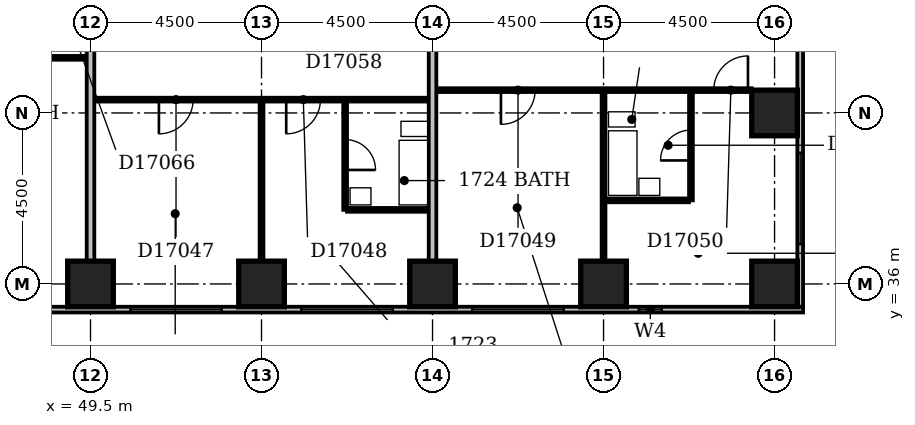
"""IFC4 building model, lengths in metres.
Left out: names, types, materials, properties, quantities, classifications, styles, units other than length and angle.
Written with IfcOpenShell. Run it as: python <this file> out.ifc"""

import sys

from ifc_helpers import new_model, si_unit, direction, frame, frame_2d, origin, origin_2d, place, context, subcontext, project, spatial, rectangle, extrude, element, fill, save


model = new_model("IFC4")
c1 = context("Model", 3, precision=1e-05, world=origin(), true_north=direction((0.0, 1.0)))
c2 = subcontext(c1, "Body", "Model", "MODEL_VIEW")
j1 = project(units=[si_unit("LENGTHUNIT", "METRE"), si_unit("PLANEANGLEUNIT", "RADIAN")], contexts=[c1])
p1 = place(None, origin())
s1 = spatial("IfcSite", under=j1, at=p1, CompositionType="ELEMENT")
p2 = place(p1, origin())
s2 = spatial("IfcBuilding", under=s1, at=p2, CompositionType="ELEMENT")
p3 = place(p2, frame((0.0, 0.0, 72.2)))
s3 = spatial("IfcBuildingStorey", under=s2, at=p3, CompositionType="ELEMENT", Elevation=72.2)
for number, where, z_axis, x_axis in (
    (1, (49.5, 36.0, -0.3), (0.0, 0.0, 1.0), (1.0, 0.0, 0.0)),
    (2, (54.0, 36.0, -0.3), (0.0, 0.0, 1.0), (1.0, 0.0, 0.0)),
    (3, (58.5, 36.0, -0.3), (0.0, 0.0, 1.0), (1.0, 0.0, 0.0)),
    (4, (63.0, 36.0, -0.3), (0.0, 0.0, 1.0), (1.0, 0.0, 0.0)),
    (5, (67.5, 36.0, -0.3), (0.0, 0.0, 1.0), (1.0, 0.0, 0.0)),
    (6, (67.5, 40.5, -0.3), (0.0, 0.0, 1.0), (1.0, 0.0, 0.0)),
):
    element("IfcColumn", number, at=place(p3, frame(where, z_axis=z_axis, x_axis=x_axis)), inside=s3, PredefinedType="COLUMN", context=c2, shape_type="SweptSolid", body=[
        extrude(rectangle(XDim=1.2, YDim=1.2, at=origin_2d()), origin(), (0.0, 0.0, 1.0), 3.6),
    ])
p4 = place(p3, frame((23.1, 35.325, 0.0), z_axis=(0.0, 0.0, 1.0), x_axis=(1.0, 0.0, 0.0)))
e7 = element("IfcWall", 7, at=p4, inside=s3, PredefinedType="STANDARD", context=c2, shape_type="SweptSolid", body=[
    extrude(rectangle(XDim=45.15, YDim=0.15, at=frame_2d((22.575, 0.0))), origin(), (0.0, 0.0, 1.0), 2.7),
])
p5 = place(p4, frame((0.45, 0.0, 0.6)))
e8 = element("IfcOpeningElement", 8, at=p5, cuts=e7, PredefinedType="OPENING", context=c2, shape_type="SweptSolid", body=[
    extrude(rectangle(XDim=2.4, YDim=1.8, at=frame_2d((1.2, 0.9))), frame((0.0, 0.087, 0.0), z_axis=(0.0, -1.0, 0.0), x_axis=(1.0, 0.0, 0.0)), (0.0, 0.0, 1.0), 0.174),
])
p6 = place(p4, frame((4.95, 0.0, 0.6)))
e9 = element("IfcOpeningElement", 9, at=p6, cuts=e7, PredefinedType="OPENING", context=c2, shape_type="SweptSolid", body=[
    extrude(rectangle(XDim=2.4, YDim=1.8, at=frame_2d((1.2, 0.9))), frame((0.0, 0.087, 0.0), z_axis=(0.0, -1.0, 0.0), x_axis=(1.0, 0.0, 0.0)), (0.0, 0.0, 1.0), 0.174),
])
p7 = place(p4, frame((9.275, 0.0, 0.6)))
e10 = element("IfcOpeningElement", 10, at=p7, cuts=e7, PredefinedType="OPENING", context=c2, shape_type="SweptSolid", body=[
    extrude(rectangle(XDim=1.5, YDim=1.8, at=frame_2d((0.75, 0.9))), frame((0.0, 0.087, 0.0), z_axis=(0.0, -1.0, 0.0), x_axis=(1.0, 0.0, 0.0)), (0.0, 0.0, 1.0), 0.174),
])
p8 = place(p4, frame((15.097, 0.0, 0.6)))
e11 = element("IfcOpeningElement", 11, at=p8, cuts=e7, PredefinedType="OPENING", context=c2, shape_type="SweptSolid", body=[
    extrude(rectangle(XDim=1.5, YDim=1.8, at=frame_2d((0.75, 0.9))), frame((0.0, 0.087, 0.0), z_axis=(0.0, -1.0, 0.0), x_axis=(1.0, 0.0, 0.0)), (0.0, 0.0, 1.0), 0.174),
])
p9 = place(p4, frame((18.45, 0.0, 0.6)))
e12 = element("IfcOpeningElement", 12, at=p9, cuts=e7, PredefinedType="OPENING", context=c2, shape_type="SweptSolid", body=[
    extrude(rectangle(XDim=2.4, YDim=1.8, at=frame_2d((1.2, 0.9))), frame((0.0, 0.087, 0.0), z_axis=(0.0, -1.0, 0.0), x_axis=(1.0, 0.0, 0.0)), (0.0, 0.0, 1.0), 0.174),
])
p10 = place(p4, frame((22.95, 0.0, 0.6)))
e13 = element("IfcOpeningElement", 13, at=p10, cuts=e7, PredefinedType="OPENING", context=c2, shape_type="SweptSolid", body=[
    extrude(rectangle(XDim=2.4, YDim=1.8, at=frame_2d((1.2, 0.9))), frame((0.0, 0.087, 0.0), z_axis=(0.0, -1.0, 0.0), x_axis=(1.0, 0.0, 0.0)), (0.0, 0.0, 1.0), 0.174),
])
p11 = place(p4, frame((27.45, 0.0, 0.6)))
e14 = element("IfcOpeningElement", 14, at=p11, cuts=e7, PredefinedType="OPENING", context=c2, shape_type="SweptSolid", body=[
    extrude(rectangle(XDim=2.4, YDim=1.8, at=frame_2d((1.2, 0.9))), frame((0.0, 0.087, 0.0), z_axis=(0.0, -1.0, 0.0), x_axis=(1.0, 0.0, 0.0)), (0.0, 0.0, 1.0), 0.174),
])
p12 = place(p4, frame((31.95, 0.0, 0.6)))
e15 = element("IfcOpeningElement", 15, at=p12, cuts=e7, PredefinedType="OPENING", context=c2, shape_type="SweptSolid", body=[
    extrude(rectangle(XDim=2.4, YDim=1.8, at=frame_2d((1.2, 0.9))), frame((0.0, 0.087, 0.0), z_axis=(0.0, -1.0, 0.0), x_axis=(1.0, 0.0, 0.0)), (0.0, 0.0, 1.0), 0.174),
])
p13 = place(p4, frame((36.45, 0.0, 0.6)))
e16 = element("IfcOpeningElement", 16, at=p13, cuts=e7, PredefinedType="OPENING", context=c2, shape_type="SweptSolid", body=[
    extrude(rectangle(XDim=2.4, YDim=1.8, at=frame_2d((1.2, 0.9))), frame((0.0, 0.087, 0.0), z_axis=(0.0, -1.0, 0.0), x_axis=(1.0, 0.0, 0.0)), (0.0, 0.0, 1.0), 0.174),
])
p14 = place(p4, frame((40.831, 0.0, 0.6)))
e17 = element("IfcOpeningElement", 17, at=p14, cuts=e7, PredefinedType="OPENING", context=c2, shape_type="SweptSolid", body=[
    extrude(rectangle(XDim=0.6, YDim=1.8, at=frame_2d((0.3, 0.9))), frame((0.0, 0.087, 0.0), z_axis=(0.0, -1.0, 0.0), x_axis=(1.0, 0.0, 0.0)), (0.0, 0.0, 1.0), 0.174),
])
p15 = place(p3, frame((68.175, 35.4, 0.0), z_axis=(0.0, 0.0, 1.0), x_axis=(0.0, 1.0, 0.0)))
e18 = element("IfcWall", 18, at=p15, inside=s3, PredefinedType="STANDARD", context=c2, shape_type="SweptSolid", body=[
    extrude(rectangle(XDim=23.85, YDim=0.15, at=frame_2d((11.925, 0.0))), origin(), (0.0, 0.0, 1.0), 2.7),
])
p16 = place(p15, frame((1.65, 0.0, 0.6)))
e19 = element("IfcOpeningElement", 19, at=p16, cuts=e18, PredefinedType="OPENING", context=c2, shape_type="SweptSolid", body=[
    extrude(rectangle(XDim=2.4, YDim=1.8, at=frame_2d((1.2, 0.9))), frame((0.0, 0.087, 0.0), z_axis=(0.0, -1.0, 0.0), x_axis=(1.0, 0.0, 0.0)), (0.0, 0.0, 1.0), 0.174),
])
p17 = place(p15, frame((10.403, 0.0, 0.6)))
e20 = element("IfcOpeningElement", 20, at=p17, cuts=e18, PredefinedType="OPENING", context=c2, shape_type="SweptSolid", body=[
    extrude(rectangle(XDim=1.5, YDim=1.8, at=frame_2d((0.75, 0.9))), frame((0.0, 0.087, 0.0), z_axis=(0.0, -1.0, 0.0), x_axis=(1.0, 0.0, 0.0)), (0.0, 0.0, 1.0), 0.174),
])
p18 = place(p15, frame((19.65, 0.0, 0.6)))
e21 = element("IfcOpeningElement", 21, at=p18, cuts=e18, PredefinedType="OPENING", context=c2, shape_type="SweptSolid", body=[
    extrude(rectangle(XDim=2.4, YDim=1.8, at=frame_2d((1.2, 0.9))), frame((0.0, 0.087, 0.0), z_axis=(0.0, -1.0, 0.0), x_axis=(1.0, 0.0, 0.0)), (0.0, 0.0, 1.0), 0.174),
])
p19 = place(p3, frame((49.5, 36.6, 0.0), z_axis=(0.0, 0.0, 1.0), x_axis=(0.0, 1.0, 0.0)))
e22 = element("IfcWall", 22, at=p19, inside=s3, PredefinedType="PARTITIONING", context=c2, shape_type="SweptSolid", body=[
    extrude(rectangle(XDim=12.8, YDim=0.2, at=frame_2d((6.4, 0.0))), origin(), (0.0, 0.0, 1.0), 3.3),
])
p20 = place(p3, frame((54.0, 36.6, 0.0), z_axis=(0.0, 0.0, 1.0), x_axis=(0.0, 1.0, 0.0)))
e23 = element("IfcWall", 23, at=p20, inside=s3, PredefinedType="PARTITIONING", context=c2, shape_type="SweptSolid", body=[
    extrude(rectangle(XDim=4.2, YDim=0.1, at=frame_2d((2.1, 0.0))), origin(), (0.0, 0.0, 1.0), 2.6),
])
p21 = place(p3, frame((58.5, 36.6, 0.0), z_axis=(0.0, 0.0, 1.0), x_axis=(0.0, 1.0, 0.0)))
e24 = element("IfcWall", 24, at=p21, inside=s3, PredefinedType="PARTITIONING", context=c2, shape_type="SweptSolid", body=[
    extrude(rectangle(XDim=12.8, YDim=0.2, at=frame_2d((6.4, 0.0))), origin(), (0.0, 0.0, 1.0), 3.3),
])
p22 = place(p3, frame((63.0, 36.6, 0.0), z_axis=(0.0, 0.0, 1.0), x_axis=(0.0, 1.0, 0.0)))
e25 = element("IfcWall", 25, at=p22, inside=s3, PredefinedType="PARTITIONING", context=c2, shape_type="SweptSolid", body=[
    extrude(rectangle(XDim=4.45, YDim=0.1, at=frame_2d((2.225, 0.0))), origin(), (0.0, 0.0, 1.0), 2.4),
])
p23 = place(p3, frame((56.2, 37.95, 0.0), z_axis=(0.0, 0.0, 1.0), x_axis=(0.0, 1.0, 0.0)))
e26 = element("IfcWall", 26, at=p23, inside=s3, PredefinedType="PLUMBINGWALL", context=c2, shape_type="SweptSolid", body=[
    extrude(rectangle(XDim=2.85, YDim=0.1, at=frame_2d((1.425, 0.0))), origin(), (0.0, 0.0, 1.0), 3.3),
])
p24 = place(p23, frame((1.05, 0.0, 0.0)))
e27 = element("IfcOpeningElement", 27, at=p24, cuts=e26, PredefinedType="OPENING", context=c2, shape_type="SweptSolid", body=[
    extrude(rectangle(XDim=0.8, YDim=2.1, at=frame_2d((0.4, 1.05))), frame((0.0, 0.062, 0.0), z_axis=(0.0, -1.0, 0.0), x_axis=(1.0, 0.0, 0.0)), (0.0, 0.0, 1.0), 0.124),
])
p25 = place(p3, frame((56.25, 37.95, 0.0), z_axis=(0.0, 0.0, 1.0), x_axis=(1.0, 0.0, 0.0)))
e28 = element("IfcWall", 28, at=p25, inside=s3, PredefinedType="PLUMBINGWALL", context=c2, shape_type="SweptSolid", body=[
    extrude(rectangle(XDim=2.15, YDim=0.1, at=frame_2d((1.075, 0.0))), origin(), (0.0, 0.0, 1.0), 3.3),
])
p26 = place(p3, frame((63.05, 38.2, 0.0), z_axis=(0.0, 0.0, 1.0), x_axis=(1.0, 0.0, 0.0)))
e29 = element("IfcWall", 29, at=p26, inside=s3, PredefinedType="PLUMBINGWALL", context=c2, shape_type="SweptSolid", body=[
    extrude(rectangle(XDim=2.2, YDim=0.1, at=frame_2d((1.1, 0.0))), origin(), (0.0, 0.0, 1.0), 3.3),
])
p27 = place(p3, frame((65.3, 38.2, 0.0), z_axis=(0.0, 0.0, 1.0), x_axis=(0.0, 1.0, 0.0)))
e30 = element("IfcWall", 30, at=p27, inside=s3, PredefinedType="PLUMBINGWALL", context=c2, shape_type="SweptSolid", body=[
    extrude(rectangle(XDim=2.85, YDim=0.1, at=frame_2d((1.425, 0.0))), origin(), (0.0, 0.0, 1.0), 3.3),
])
p28 = place(p27, frame((1.05, 0.0, 0.0)))
e31 = element("IfcOpeningElement", 31, at=p28, cuts=e30, PredefinedType="OPENING", context=c2, shape_type="SweptSolid", body=[
    extrude(rectangle(XDim=0.8, YDim=2.1, at=frame_2d((0.4, 1.05))), frame((0.0, 0.062, 0.0), z_axis=(0.0, -1.0, 0.0), x_axis=(1.0, 0.0, 0.0)), (0.0, 0.0, 1.0), 0.124),
])
p29 = place(p3, frame((49.6, 40.85, 0.0), z_axis=(0.0, 0.0, 1.0), x_axis=(1.0, 0.0, 0.0)))
e32 = element("IfcWall", 32, at=p29, inside=s3, PredefinedType="PARTITIONING", context=c2, shape_type="SweptSolid", body=[
    extrude(rectangle(XDim=8.8, YDim=0.1, at=frame_2d((4.4, 0.0))), origin(), (0.0, 0.0, 1.0), 3.3),
])
p30 = place(p29, frame((1.7, 0.0, 0.0)))
e33 = element("IfcOpeningElement", 33, at=p30, cuts=e32, PredefinedType="OPENING", context=c2, shape_type="SweptSolid", body=[
    extrude(rectangle(XDim=0.9, YDim=2.1, at=frame_2d((0.45, 1.05))), frame((0.0, 0.062, 0.0), z_axis=(0.0, -1.0, 0.0), x_axis=(1.0, 0.0, 0.0)), (0.0, 0.0, 1.0), 0.124),
])
p31 = place(p29, frame((5.05, 0.0, 0.0)))
e34 = element("IfcOpeningElement", 34, at=p31, cuts=e32, PredefinedType="OPENING", context=c2, shape_type="SweptSolid", body=[
    extrude(rectangle(XDim=0.9, YDim=2.1, at=frame_2d((0.45, 1.05))), frame((0.0, 0.062, 0.0), z_axis=(0.0, -1.0, 0.0), x_axis=(1.0, 0.0, 0.0)), (0.0, 0.0, 1.0), 0.124),
])
p32 = place(p3, frame((58.6, 41.1, 0.0), z_axis=(0.0, 0.0, 1.0), x_axis=(1.0, 0.0, 0.0)))
e35 = element("IfcWall", 35, at=p32, inside=s3, PredefinedType="PARTITIONING", context=c2, shape_type="SweptSolid", body=[
    extrude(rectangle(XDim=8.3, YDim=0.1, at=frame_2d((4.15, 0.0))), origin(), (0.0, 0.0, 1.0), 3.3),
])
p33 = place(p32, frame((1.7, 0.0, 0.0)))
e36 = element("IfcOpeningElement", 36, at=p33, cuts=e35, PredefinedType="OPENING", context=c2, shape_type="SweptSolid", body=[
    extrude(rectangle(XDim=0.9, YDim=2.1, at=frame_2d((0.45, 1.05))), frame((0.0, 0.062, 0.0), z_axis=(0.0, -1.0, 0.0), x_axis=(1.0, 0.0, 0.0)), (0.0, 0.0, 1.0), 0.124),
])
p34 = place(p32, frame((7.3, 0.0, 0.0)))
e37 = element("IfcOpeningElement", 37, at=p34, cuts=e35, PredefinedType="OPENING", context=c2, shape_type="SweptSolid", body=[
    extrude(rectangle(XDim=0.9, YDim=2.1, at=frame_2d((0.45, 1.05))), frame((0.0, 0.062, 0.0), z_axis=(0.0, -1.0, 0.0), x_axis=(1.0, 0.0, 0.0)), (0.0, 0.0, 1.0), 0.124),
])
p35 = place(p3, frame((45.1, 41.95, 0.0), z_axis=(0.0, 0.0, 1.0), x_axis=(1.0, 0.0, 0.0)))
e38 = element("IfcWall", 38, at=p35, inside=s3, PredefinedType="PARTITIONING", context=c2, shape_type="SweptSolid", body=[
    extrude(rectangle(XDim=4.3, YDim=0.1, at=frame_2d((2.15, 0.0))), origin(), (0.0, 0.0, 1.0), 3.3),
])
p36 = place(p35, frame((1.7, 0.0, 0.0)))
e39 = element("IfcOpeningElement", 39, at=p36, cuts=e38, PredefinedType="OPENING", context=c2, shape_type="SweptSolid", body=[
    extrude(rectangle(XDim=0.9, YDim=2.1, at=frame_2d((0.45, 1.05))), frame((0.0, 0.062, 0.0), z_axis=(0.0, -1.0, 0.0), x_axis=(1.0, 0.0, 0.0)), (0.0, 0.0, 1.0), 0.124),
])
p37 = place(p11, origin())
e40 = element("IfcWindow", 40, at=p37, inside=s3, PartitioningType="SINGLE_PANEL", PredefinedType="WINDOW", context=c2, shape_type="SweptSolid", body=[
    extrude(rectangle(XDim=2.4, YDim=1.8, at=frame_2d((1.2, 0.9))), frame((0.0, 0.03, 0.0), z_axis=(0.0, -1.0, 0.0), x_axis=(1.0, 0.0, 0.0)), (0.0, 0.0, 1.0), 0.06),
])
fill(e14, e40)
p38 = place(p12, origin())
e41 = element("IfcWindow", 41, at=p38, inside=s3, PartitioningType="SINGLE_PANEL", PredefinedType="WINDOW", context=c2, shape_type="SweptSolid", body=[
    extrude(rectangle(XDim=2.4, YDim=1.8, at=frame_2d((1.2, 0.9))), frame((0.0, 0.03, 0.0), z_axis=(0.0, -1.0, 0.0), x_axis=(1.0, 0.0, 0.0)), (0.0, 0.0, 1.0), 0.06),
])
fill(e15, e41)
p39 = place(p13, origin())
e42 = element("IfcWindow", 42, at=p39, inside=s3, PartitioningType="SINGLE_PANEL", PredefinedType="WINDOW", context=c2, shape_type="SweptSolid", body=[
    extrude(rectangle(XDim=2.4, YDim=1.8, at=frame_2d((1.2, 0.9))), frame((0.0, 0.03, 0.0), z_axis=(0.0, -1.0, 0.0), x_axis=(1.0, 0.0, 0.0)), (0.0, 0.0, 1.0), 0.06),
])
fill(e16, e42)
p40 = place(p14, origin())
e43 = element("IfcWindow", 43, at=p40, inside=s3, PartitioningType="SINGLE_PANEL", PredefinedType="WINDOW", context=c2, shape_type="SweptSolid", body=[
    extrude(rectangle(XDim=0.6, YDim=1.8, at=frame_2d((0.3, 0.9))), frame((0.0, 0.03, 0.0), z_axis=(0.0, -1.0, 0.0), x_axis=(1.0, 0.0, 0.0)), (0.0, 0.0, 1.0), 0.06),
])
fill(e17, e43)
p41 = place(p16, origin())
e44 = element("IfcWindow", 44, at=p41, inside=s3, PartitioningType="SINGLE_PANEL", PredefinedType="WINDOW", context=c2, shape_type="SweptSolid", body=[
    extrude(rectangle(XDim=2.4, YDim=1.8, at=frame_2d((1.2, 0.9))), frame((0.0, 0.03, 0.0), z_axis=(0.0, -1.0, 0.0), x_axis=(1.0, 0.0, 0.0)), (0.0, 0.0, 1.0), 0.06),
])
fill(e19, e44)
p42 = place(p24, frame((0.8, 0.0, 0.0), z_axis=(0.0, 0.0, 1.0), x_axis=(-1.0, 0.0, 0.0)))
e45 = element("IfcDoor", 45, at=p42, inside=s3, OperationType="SINGLE_SWING_RIGHT", PredefinedType="DOOR", context=c2, shape_type="SweptSolid", body=[
    extrude(rectangle(XDim=0.8, YDim=2.1, at=frame_2d((0.4, 1.05))), frame((0.0, 0.025, 0.0), z_axis=(0.0, -1.0, 0.0), x_axis=(1.0, 0.0, 0.0)), (0.0, 0.0, 1.0), 0.05),
])
fill(e27, e45)
p43 = place(p28, origin())
e46 = element("IfcDoor", 46, at=p43, inside=s3, OperationType="SINGLE_SWING_LEFT", PredefinedType="DOOR", context=c2, shape_type="SweptSolid", body=[
    extrude(rectangle(XDim=0.8, YDim=2.1, at=frame_2d((0.4, 1.05))), frame((0.0, 0.025, 0.0), z_axis=(0.0, -1.0, 0.0), x_axis=(1.0, 0.0, 0.0)), (0.0, 0.0, 1.0), 0.05),
])
fill(e31, e46)
p44 = place(p30, frame((0.9, 0.0, 0.0), z_axis=(0.0, 0.0, 1.0), x_axis=(-1.0, 0.0, 0.0)))
e47 = element("IfcDoor", 47, at=p44, inside=s3, OperationType="SINGLE_SWING_RIGHT", PredefinedType="DOOR", context=c2, shape_type="SweptSolid", body=[
    extrude(rectangle(XDim=0.9, YDim=2.1, at=frame_2d((0.45, 1.05))), frame((0.0, 0.025, 0.0), z_axis=(0.0, -1.0, 0.0), x_axis=(1.0, 0.0, 0.0)), (0.0, 0.0, 1.0), 0.05),
])
fill(e33, e47)
p45 = place(p31, frame((0.9, 0.0, 0.0), z_axis=(0.0, 0.0, 1.0), x_axis=(-1.0, 0.0, 0.0)))
e48 = element("IfcDoor", 48, at=p45, inside=s3, OperationType="SINGLE_SWING_RIGHT", PredefinedType="DOOR", context=c2, shape_type="SweptSolid", body=[
    extrude(rectangle(XDim=0.9, YDim=2.1, at=frame_2d((0.45, 1.05))), frame((0.0, 0.025, 0.0), z_axis=(0.0, -1.0, 0.0), x_axis=(1.0, 0.0, 0.0)), (0.0, 0.0, 1.0), 0.05),
])
fill(e34, e48)
p46 = place(p33, frame((0.9, 0.0, 0.0), z_axis=(0.0, 0.0, 1.0), x_axis=(-1.0, 0.0, 0.0)))
e49 = element("IfcDoor", 49, at=p46, inside=s3, OperationType="SINGLE_SWING_RIGHT", PredefinedType="DOOR", context=c2, shape_type="SweptSolid", body=[
    extrude(rectangle(XDim=0.9, YDim=2.1, at=frame_2d((0.45, 1.05))), frame((0.0, 0.025, 0.0), z_axis=(0.0, -1.0, 0.0), x_axis=(1.0, 0.0, 0.0)), (0.0, 0.0, 1.0), 0.05),
])
fill(e36, e49)
p47 = place(p34, frame((0.9, 0.0, 0.0), z_axis=(0.0, 0.0, 1.0), x_axis=(-1.0, 0.0, 0.0)))
e50 = element("IfcDoor", 50, at=p47, inside=s3, OperationType="SINGLE_SWING_LEFT", PredefinedType="DOOR", context=c2, shape_type="SweptSolid", body=[
    extrude(rectangle(XDim=0.9, YDim=2.1, at=frame_2d((0.45, 1.05))), frame((0.0, 0.025, 0.0), z_axis=(0.0, -1.0, 0.0), x_axis=(1.0, 0.0, 0.0)), (0.0, 0.0, 1.0), 0.05),
])
fill(e37, e50)
save(model, sys.argv[1])
